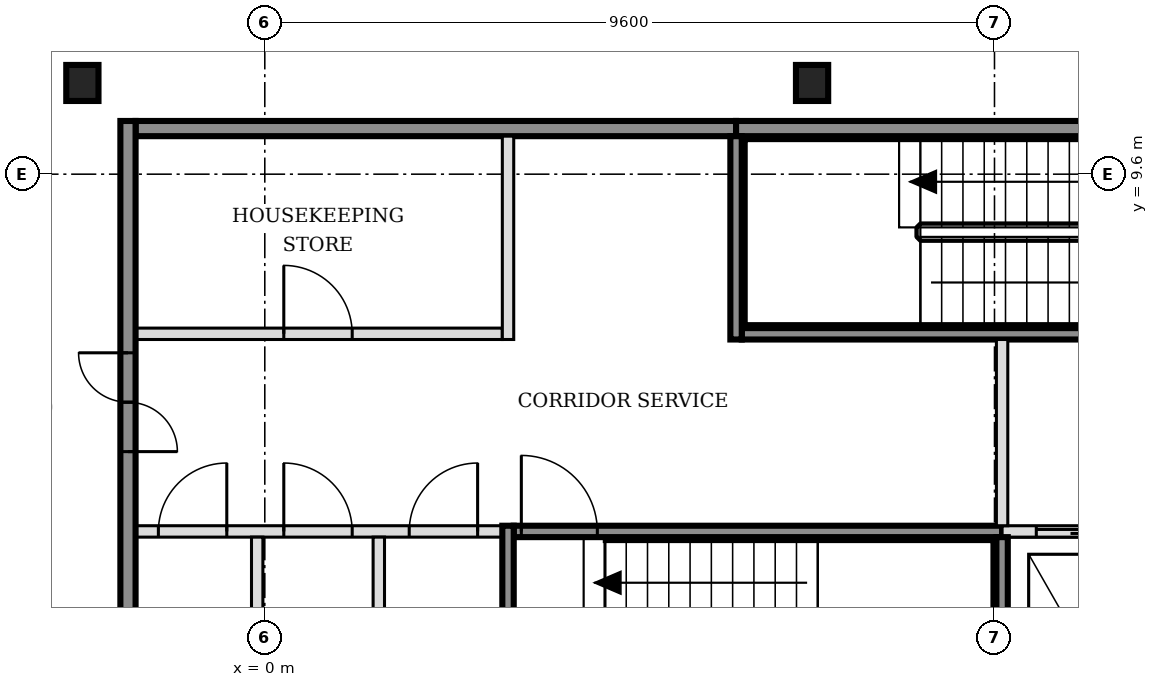
"""IFC4 building model, lengths in metres.
Left out: names, types, materials, properties, quantities, classifications, styles, units other than length and angle.
Written with IfcOpenShell. Run it as: python <this file> out.ifc"""

import sys

from ifc_helpers import new_model, si_unit, direction, frame, frame_2d, origin, origin_2d, place, context, subcontext, project, spatial, rectangle, i_section, extrude, element, fill, save


model = new_model("IFC4")
c1 = context("Model", 3, precision=1e-05, world=origin(), true_north=direction((0.0, 1.0)))
c2 = subcontext(c1, "Body", "Model", "MODEL_VIEW")
j1 = project(units=[si_unit("LENGTHUNIT", "METRE"), si_unit("PLANEANGLEUNIT", "RADIAN")], contexts=[c1])
p1 = place(None, origin())
s1 = spatial("IfcSite", under=j1, at=p1, CompositionType="ELEMENT")
p2 = place(p1, origin())
s2 = spatial("IfcBuilding", under=s1, at=p2, CompositionType="ELEMENT")
p3 = place(p2, frame((0.0, 0.0, 105.0)))
s3 = spatial("IfcBuildingStorey", under=s2, at=p3, CompositionType="ELEMENT", Elevation=105.0)
for number, where, z_axis, x_axis in (
    (1, (-2.4, 10.8, -0.15), (0.0, 0.0, 1.0), (1.0, 0.0, 0.0)),
    (2, (7.2, 10.8, -0.15), (0.0, 0.0, 1.0), (1.0, 0.0, 0.0)),
):
    element("IfcColumn", number, at=place(p3, frame(where, z_axis=z_axis, x_axis=x_axis)), inside=s3, PredefinedType="COLUMN", context=c2, shape_type="SweptSolid", body=[
        extrude(i_section(OverallWidth=0.424, OverallDepth=0.474, WebThickness=0.048, FlangeThickness=0.077, FilletRadius=0.015, at=origin_2d()), origin(), (0.0, 0.0, 1.0), 3.6),
    ])
p4 = place(p3, frame((-1.7, 4.9, 0.0), z_axis=(0.0, 0.0, 1.0), x_axis=(1.0, 0.0, 0.0)))
e3 = element("IfcWall", 3, at=p4, inside=s3, PredefinedType="PARTITIONING", context=c2, shape_type="SweptSolid", body=[
    extrude(rectangle(XDim=4.825, YDim=0.15, at=frame_2d((2.413, 0.0))), origin(), (0.0, 0.0, 1.0), 3.45),
])
p5 = place(p4, frame((0.3, 0.0, 0.0)))
e4 = element("IfcOpeningElement", 4, at=p5, cuts=e3, PredefinedType="OPENING", context=c2, shape_type="SweptSolid", body=[
    extrude(rectangle(XDim=0.9, YDim=2.1, at=frame_2d((0.45, 1.05))), frame((0.0, 0.085, 0.0), z_axis=(0.0, -1.0, 0.0), x_axis=(1.0, 0.0, 0.0)), (0.0, 0.0, 1.0), 0.17),
])
p6 = place(p4, frame((1.95, 0.0, 0.0)))
e5 = element("IfcOpeningElement", 5, at=p6, cuts=e3, PredefinedType="OPENING", context=c2, shape_type="SweptSolid", body=[
    extrude(rectangle(XDim=0.9, YDim=2.1, at=frame_2d((0.45, 1.05))), frame((0.0, 0.085, 0.0), z_axis=(0.0, -1.0, 0.0), x_axis=(1.0, 0.0, 0.0)), (0.0, 0.0, 1.0), 0.17),
])
p7 = place(p4, frame((3.6, 0.0, 0.0)))
e6 = element("IfcOpeningElement", 6, at=p7, cuts=e3, PredefinedType="OPENING", context=c2, shape_type="SweptSolid", body=[
    extrude(rectangle(XDim=0.9, YDim=2.1, at=frame_2d((0.45, 1.05))), frame((0.0, 0.085, 0.0), z_axis=(0.0, -1.0, 0.0), x_axis=(1.0, 0.0, 0.0)), (0.0, 0.0, 1.0), 0.17),
])
p8 = place(p3, frame((3.275, 4.9, 0.0), z_axis=(0.0, 0.0, 1.0), x_axis=(1.0, 0.0, 0.0)))
e7 = element("IfcWall", 7, at=p8, inside=s3, PredefinedType="SOLIDWALL", context=c2, shape_type="SweptSolid", body=[
    extrude(rectangle(XDim=6.425, YDim=0.15, at=frame_2d((3.212, 0.0))), origin(), (0.0, 0.0, 1.0), 3.45),
])
p9 = place(p8, frame((0.1, 0.0, 0.0)))
e8 = element("IfcOpeningElement", 8, at=p9, cuts=e7, PredefinedType="OPENING", context=c2, shape_type="SweptSolid", body=[
    extrude(rectangle(XDim=1.0, YDim=2.1, at=frame_2d((0.5, 1.05))), frame((0.0, 0.085, 0.0), z_axis=(0.0, -1.0, 0.0), x_axis=(1.0, 0.0, 0.0)), (0.0, 0.0, 1.0), 0.17),
])
p10 = place(p3, frame((9.7, 4.9, 0.0), z_axis=(0.0, 0.0, 1.0), x_axis=(1.0, 0.0, 0.0)))
e9 = element("IfcWall", 9, at=p10, inside=s3, PredefinedType="SOLIDWALL", context=c2, shape_type="SweptSolid", body=[
    extrude(rectangle(XDim=6.4, YDim=0.15, at=frame_2d((3.2, 0.0))), origin(), (0.0, 0.0, 1.0), 3.45),
])
p11 = place(p10, frame((0.45, 0.0, 0.0)))
e10 = element("IfcOpeningElement", 10, at=p11, cuts=e9, PredefinedType="OPENING", context=c2, shape_type="SweptSolid", body=[
    extrude(rectangle(XDim=1.0, YDim=2.1, at=frame_2d((0.5, 1.05))), frame((0.0, 0.085, 0.0), z_axis=(0.0, -1.0, 0.0), x_axis=(1.0, 0.0, 0.0)), (0.0, 0.0, 1.0), 0.17),
])
p12 = place(p10, frame((2.35, 0.0, 0.0)))
e11 = element("IfcOpeningElement", 11, at=p12, cuts=e9, PredefinedType="OPENING", context=c2, shape_type="SweptSolid", body=[
    extrude(rectangle(XDim=1.0, YDim=2.1, at=frame_2d((0.5, 1.05))), frame((0.0, 0.085, 0.0), z_axis=(0.0, -1.0, 0.0), x_axis=(1.0, 0.0, 0.0)), (0.0, 0.0, 1.0), 0.17),
])
p13 = place(p10, frame((4.7, 0.0, 0.0)))
e12 = element("IfcOpeningElement", 12, at=p13, cuts=e9, PredefinedType="OPENING", context=c2, shape_type="SweptSolid", body=[
    extrude(rectangle(XDim=0.9, YDim=2.1, at=frame_2d((0.45, 1.05))), frame((0.0, 0.085, 0.0), z_axis=(0.0, -1.0, 0.0), x_axis=(1.0, 0.0, 0.0)), (0.0, 0.0, 1.0), 0.17),
])
p14 = place(p3, frame((-1.7, 7.5, 0.0), z_axis=(0.0, 0.0, 1.0), x_axis=(1.0, 0.0, 0.0)))
e13 = element("IfcWall", 13, at=p14, inside=s3, PredefinedType="PARTITIONING", context=c2, shape_type="SweptSolid", body=[
    extrude(rectangle(XDim=4.825, YDim=0.15, at=frame_2d((2.413, 0.0))), origin(), (0.0, 0.0, 1.0), 3.45),
])
p15 = place(p14, frame((1.95, 0.0, 0.0)))
e14 = element("IfcOpeningElement", 14, at=p15, cuts=e13, PredefinedType="OPENING", context=c2, shape_type="SweptSolid", body=[
    extrude(rectangle(XDim=0.9, YDim=2.1, at=frame_2d((0.45, 1.05))), frame((0.0, 0.085, 0.0), z_axis=(0.0, -1.0, 0.0), x_axis=(1.0, 0.0, 0.0)), (0.0, 0.0, 1.0), 0.17),
])
p16 = place(p3, frame((6.275, 7.5, 0.0), z_axis=(0.0, 0.0, 1.0), x_axis=(1.0, 0.0, 0.0)))
e15 = element("IfcWall", 15, at=p16, inside=s3, PredefinedType="SOLIDWALL", context=c2, shape_type="SweptSolid", body=[
    extrude(rectangle(XDim=6.425, YDim=0.15, at=frame_2d((3.212, 0.0))), origin(), (0.0, 0.0, 1.0), 3.45),
])
p17 = place(p16, frame((5.225, 0.0, 0.0)))
e16 = element("IfcOpeningElement", 16, at=p17, cuts=e15, PredefinedType="OPENING", context=c2, shape_type="SweptSolid", body=[
    extrude(rectangle(XDim=1.0, YDim=2.1, at=frame_2d((0.5, 1.05))), frame((0.0, 0.085, 0.0), z_axis=(0.0, -1.0, 0.0), x_axis=(1.0, 0.0, 0.0)), (0.0, 0.0, 1.0), 0.17),
])
p18 = place(p3, frame((-1.7, 10.2, 0.0), z_axis=(0.0, 0.0, 1.0), x_axis=(1.0, 0.0, 0.0)))
e17 = element("IfcWall", 17, at=p18, inside=s3, PredefinedType="SOLIDWALL", context=c2, shape_type="SweptSolid", body=[
    extrude(rectangle(XDim=7.9, YDim=0.2, at=frame_2d((3.95, 0.0))), origin(), (0.0, 0.0, 1.0), 3.45),
])
p19 = place(p3, frame((6.2, 10.2, 0.0), z_axis=(0.0, 0.0, 1.0), x_axis=(1.0, 0.0, 0.0)))
e18 = element("IfcWall", 18, at=p19, inside=s3, PredefinedType="SOLIDWALL", context=c2, shape_type="SweptSolid", body=[
    extrude(rectangle(XDim=6.5, YDim=0.2, at=frame_2d((3.25, 0.0))), origin(), (0.0, 0.0, 1.0), 3.45),
])
p20 = place(p3, frame((-1.8, -5.5, 0.0), z_axis=(0.0, 0.0, 1.0), x_axis=(0.0, 1.0, 0.0)))
e19 = element("IfcWall", 19, at=p20, inside=s3, PredefinedType="SOLIDWALL", context=c2, shape_type="SweptSolid", body=[
    extrude(rectangle(XDim=15.8, YDim=0.2, at=frame_2d((7.9, 0.0))), origin(), (0.0, 0.0, 1.0), 3.45),
])
p21 = place(p20, frame((3.05, 0.0, 0.0)))
e20 = element("IfcOpeningElement", 20, at=p21, cuts=e19, PredefinedType="OPENING", context=c2, shape_type="SweptSolid", body=[
    extrude(rectangle(XDim=1.3, YDim=2.1, at=frame_2d((0.65, 1.05))), frame((0.0, 0.11, 0.0), z_axis=(0.0, -1.0, 0.0), x_axis=(1.0, 0.0, 0.0)), (0.0, 0.0, 1.0), 0.22),
])
p22 = place(p20, frame((11.45, 0.0, 0.0)))
e21 = element("IfcOpeningElement", 21, at=p22, cuts=e19, PredefinedType="OPENING", context=c2, shape_type="SweptSolid", body=[
    extrude(rectangle(XDim=1.3, YDim=2.1, at=frame_2d((0.65, 1.05))), frame((0.0, 0.11, 0.0), z_axis=(0.0, -1.0, 0.0), x_axis=(1.0, 0.0, 0.0)), (0.0, 0.0, 1.0), 0.22),
])
for number, where, z_axis, x_axis in (
    (22, (-0.1, 2.275, 0.0), (0.0, 0.0, 1.0), (0.0, 1.0, 0.0)),
    (23, (1.5, 2.275, 0.0), (0.0, 0.0, 1.0), (0.0, 1.0, 0.0)),
):
    element("IfcWall", number, at=place(p3, frame(where, z_axis=z_axis, x_axis=x_axis)), inside=s3, PredefinedType="PARTITIONING", context=c2, shape_type="SweptSolid", body=[
        extrude(rectangle(XDim=2.55, YDim=0.15, at=frame_2d((1.275, 0.0))), origin(), (0.0, 0.0, 1.0), 3.45),
    ])
p23 = place(p3, frame((3.2, 2.275, 0.0), z_axis=(0.0, 0.0, 1.0), x_axis=(0.0, 1.0, 0.0)))
e24 = element("IfcWall", 24, at=p23, inside=s3, PredefinedType="SOLIDWALL", context=c2, shape_type="SweptSolid", body=[
    extrude(rectangle(XDim=2.7, YDim=0.15, at=frame_2d((1.35, 0.0))), origin(), (0.0, 0.0, 1.0), 3.45),
])
p24 = place(p3, frame((3.2, 7.425, 0.0), z_axis=(0.0, 0.0, 1.0), x_axis=(0.0, 1.0, 0.0)))
e25 = element("IfcWall", 25, at=p24, inside=s3, PredefinedType="PARTITIONING", context=c2, shape_type="SweptSolid", body=[
    extrude(rectangle(XDim=2.675, YDim=0.15, at=frame_2d((1.337, 0.0))), origin(), (0.0, 0.0, 1.0), 3.45),
])
p25 = place(p3, frame((6.2, 7.425, 0.0), z_axis=(0.0, 0.0, 1.0), x_axis=(0.0, 1.0, 0.0)))
e26 = element("IfcWall", 26, at=p25, inside=s3, PredefinedType="SOLIDWALL", context=c2, shape_type="SweptSolid", body=[
    extrude(rectangle(XDim=2.675, YDim=0.15, at=frame_2d((1.337, 0.0))), origin(), (0.0, 0.0, 1.0), 3.45),
])
p26 = place(p3, frame((9.7, 2.275, 0.0), z_axis=(0.0, 0.0, 1.0), x_axis=(0.0, 1.0, 0.0)))
e27 = element("IfcWall", 27, at=p26, inside=s3, PredefinedType="SOLIDWALL", context=c2, shape_type="SweptSolid", body=[
    extrude(rectangle(XDim=2.55, YDim=0.15, at=frame_2d((1.275, 0.0))), origin(), (0.0, 0.0, 1.0), 3.45),
])
p27 = place(p3, frame((9.7, 4.975, 0.0), z_axis=(0.0, 0.0, 1.0), x_axis=(0.0, 1.0, 0.0)))
e28 = element("IfcWall", 28, at=p27, inside=s3, PredefinedType="SOLIDWALL", context=c2, shape_type="SweptSolid", body=[
    extrude(rectangle(XDim=2.45, YDim=0.15, at=frame_2d((1.225, 0.0))), origin(), (0.0, 0.0, 1.0), 3.45),
])
p28 = place(p11, origin())
e29 = element("IfcDoor", 29, at=p28, inside=s3, OperationType="DOUBLE_DOOR_SLIDING", PredefinedType="DOOR", context=c2, shape_type="SweptSolid", body=[
    extrude(rectangle(XDim=1.0, YDim=2.1, at=frame_2d((0.5, 1.05))), frame((0.0, 0.025, 0.0), z_axis=(0.0, -1.0, 0.0), x_axis=(1.0, 0.0, 0.0)), (0.0, 0.0, 1.0), 0.05),
])
fill(e10, e29)
p29 = place(p9, origin())
e30 = element("IfcDoor", 30, at=p29, inside=s3, OperationType="SINGLE_SWING_LEFT", PredefinedType="DOOR", context=c2, shape_type="SweptSolid", body=[
    extrude(rectangle(XDim=1.0, YDim=2.1, at=frame_2d((0.5, 1.05))), frame((0.0, 0.025, 0.0), z_axis=(0.0, -1.0, 0.0), x_axis=(1.0, 0.0, 0.0)), (0.0, 0.0, 1.0), 0.05),
])
fill(e8, e30)
p30 = place(p22, origin())
e31 = element("IfcDoor", 31, at=p30, inside=s3, OperationType="DOUBLE_DOOR_SINGLE_SWING", PredefinedType="DOOR", context=c2, shape_type="SweptSolid", body=[
    extrude(rectangle(XDim=1.3, YDim=2.1, at=frame_2d((0.65, 1.05))), frame((0.0, 0.025, 0.0), z_axis=(0.0, -1.0, 0.0), x_axis=(1.0, 0.0, 0.0)), (0.0, 0.0, 1.0), 0.05),
])
fill(e21, e31)
p31 = place(p5, origin())
e32 = element("IfcDoor", 32, at=p31, inside=s3, OperationType="SINGLE_SWING_RIGHT", PredefinedType="DOOR", context=c2, shape_type="SweptSolid", body=[
    extrude(rectangle(XDim=0.9, YDim=2.1, at=frame_2d((0.45, 1.05))), frame((0.0, 0.025, 0.0), z_axis=(0.0, -1.0, 0.0), x_axis=(1.0, 0.0, 0.0)), (0.0, 0.0, 1.0), 0.05),
])
fill(e4, e32)
p32 = place(p6, origin())
e33 = element("IfcDoor", 33, at=p32, inside=s3, OperationType="SINGLE_SWING_LEFT", PredefinedType="DOOR", context=c2, shape_type="SweptSolid", body=[
    extrude(rectangle(XDim=0.9, YDim=2.1, at=frame_2d((0.45, 1.05))), frame((0.0, 0.025, 0.0), z_axis=(0.0, -1.0, 0.0), x_axis=(1.0, 0.0, 0.0)), (0.0, 0.0, 1.0), 0.05),
])
fill(e5, e33)
p33 = place(p7, origin())
e34 = element("IfcDoor", 34, at=p33, inside=s3, OperationType="SINGLE_SWING_RIGHT", PredefinedType="DOOR", context=c2, shape_type="SweptSolid", body=[
    extrude(rectangle(XDim=0.9, YDim=2.1, at=frame_2d((0.45, 1.05))), frame((0.0, 0.025, 0.0), z_axis=(0.0, -1.0, 0.0), x_axis=(1.0, 0.0, 0.0)), (0.0, 0.0, 1.0), 0.05),
])
fill(e6, e34)
p34 = place(p15, origin())
e35 = element("IfcDoor", 35, at=p34, inside=s3, OperationType="SINGLE_SWING_LEFT", PredefinedType="DOOR", context=c2, shape_type="SweptSolid", body=[
    extrude(rectangle(XDim=0.9, YDim=2.1, at=frame_2d((0.45, 1.05))), frame((0.0, 0.025, 0.0), z_axis=(0.0, -1.0, 0.0), x_axis=(1.0, 0.0, 0.0)), (0.0, 0.0, 1.0), 0.05),
])
fill(e14, e35)
save(model, sys.argv[1])
